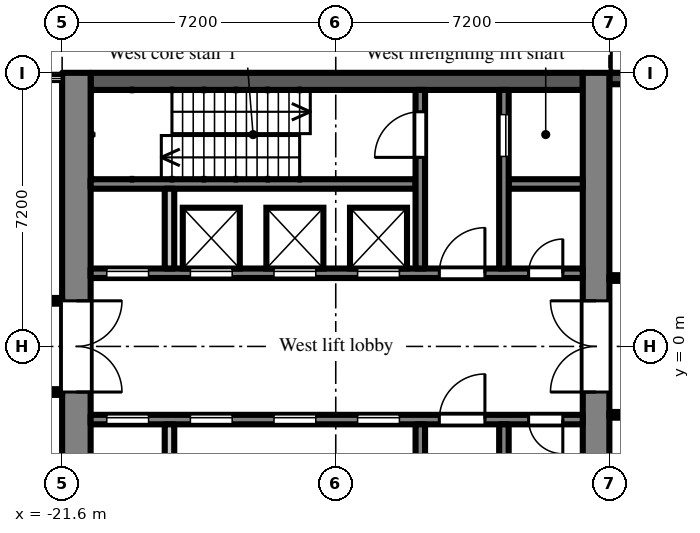
"""IFC4 building model, lengths in metres.
Left out: names, types, materials, properties, quantities, classifications, styles, units other than length and angle.
Written with IfcOpenShell. Run it as: python <this file> out.ifc"""

import sys

from ifc_helpers import new_model, si_unit, direction, frame, frame_2d, origin, place, context, subcontext, project, spatial, rectangle, extrude, element, fill, save


model = new_model("IFC4")
c1 = context("Model", 3, precision=1e-05, world=origin(), true_north=direction((0.0, 1.0)))
c2 = subcontext(c1, "Body", "Model", "MODEL_VIEW")
j1 = project(units=[si_unit("LENGTHUNIT", "METRE"), si_unit("PLANEANGLEUNIT", "RADIAN")], contexts=[c1])
p1 = place(None, origin())
s1 = spatial("IfcSite", under=j1, at=p1, CompositionType="ELEMENT")
p2 = place(p1, origin())
s2 = spatial("IfcBuilding", under=s1, at=p2, CompositionType="ELEMENT")
p3 = place(p2, frame((0.0, 0.0, 116.1)))
s3 = spatial("IfcBuildingStorey", under=s2, at=p3, CompositionType="ELEMENT", Elevation=116.1)
p4 = place(p3, frame((-4.2, 7.05, 0.0), z_axis=(0.0, 0.0, 1.0), x_axis=(-1.0, 0.0, 0.0)))
e1 = element("IfcWall", 1, at=p4, inside=s3, PredefinedType="SOLIDWALL", context=c2, shape_type="SweptSolid", body=[
    extrude(rectangle(XDim=3.0, YDim=0.3, at=frame_2d((1.5, 0.0))), origin(), (0.0, 0.0, 1.0), 3.4),
])
p5 = place(p3, frame((-7.55, -7.2, 0.0), z_axis=(0.0, 0.0, 1.0), x_axis=(0.0, 1.0, 0.0)))
e2 = element("IfcWall", 2, at=p5, inside=s3, PredefinedType="SHEAR", context=c2, shape_type="SweptSolid", body=[
    extrude(rectangle(XDim=14.4, YDim=0.7, at=frame_2d((7.2, 0.0))), origin(), (0.0, 0.0, 1.0), 3.8),
])
p6 = place(p5, frame((6.0, 0.0, 0.0)))
e3 = element("IfcOpeningElement", 3, at=p6, cuts=e2, PredefinedType="OPENING", context=c2, shape_type="SweptSolid", body=[
    extrude(rectangle(XDim=2.4, YDim=2.2, at=frame_2d((1.2, 1.1))), frame((0.0, 0.36, 0.0), z_axis=(0.0, -1.0, 0.0), x_axis=(1.0, 0.0, 0.0)), (0.0, 0.0, 1.0), 0.72),
])
p7 = place(p3, frame((-21.225, -7.2, 0.0), z_axis=(0.0, 0.0, 1.0), x_axis=(0.0, 1.0, 0.0)))
e4 = element("IfcWall", 4, at=p7, inside=s3, PredefinedType="SHEAR", context=c2, shape_type="SweptSolid", body=[
    extrude(rectangle(XDim=14.4, YDim=0.75, at=frame_2d((7.2, 0.0))), origin(), (0.0, 0.0, 1.0), 3.8),
])
p8 = place(p7, frame((6.0, 0.0, 0.0)))
e5 = element("IfcOpeningElement", 5, at=p8, cuts=e4, PredefinedType="OPENING", context=c2, shape_type="SweptSolid", body=[
    extrude(rectangle(XDim=2.4, YDim=2.2, at=frame_2d((1.2, 1.1))), frame((0.0, 0.385, 0.0), z_axis=(0.0, -1.0, 0.0), x_axis=(1.0, 0.0, 0.0)), (0.0, 0.0, 1.0), 0.77),
])
p9 = place(p3, frame((-7.9, 6.975, 0.0), z_axis=(0.0, 0.0, 1.0), x_axis=(-1.0, 0.0, 0.0)))
e6 = element("IfcWall", 6, at=p9, inside=s3, PredefinedType="SHEAR", context=c2, shape_type="SweptSolid", body=[
    extrude(rectangle(XDim=12.95, YDim=0.45, at=frame_2d((6.475, 0.0))), origin(), (0.0, 0.0, 1.0), 3.8),
])
p10 = place(p3, frame((-7.9, 1.925, 0.0), z_axis=(0.0, 0.0, 1.0), x_axis=(-1.0, 0.0, 0.0)))
e7 = element("IfcWall", 7, at=p10, inside=s3, PredefinedType="SHEAR", context=c2, shape_type="SweptSolid", body=[
    extrude(rectangle(XDim=12.95, YDim=0.25, at=frame_2d((6.475, 0.0))), origin(), (0.0, 0.0, 1.0), 3.8),
])
p11 = place(p10, frame((4.825, 0.0, 0.0)))
e8 = element("IfcOpeningElement", 8, at=p11, cuts=e7, PredefinedType="OPENING", context=c2, shape_type="SweptSolid", body=[
    extrude(rectangle(XDim=1.1, YDim=2.1, at=frame_2d((0.55, 1.05))), frame((0.0, 0.135, 0.0), z_axis=(0.0, -1.0, 0.0), x_axis=(1.0, 0.0, 0.0)), (0.0, 0.0, 1.0), 0.27),
])
p12 = place(p10, frame((7.025, 0.0, 0.0)))
e9 = element("IfcOpeningElement", 9, at=p12, cuts=e7, PredefinedType="OPENING", context=c2, shape_type="SweptSolid", body=[
    extrude(rectangle(XDim=1.1, YDim=2.1, at=frame_2d((0.55, 1.05))), frame((0.0, 0.135, 0.0), z_axis=(0.0, -1.0, 0.0), x_axis=(1.0, 0.0, 0.0)), (0.0, 0.0, 1.0), 0.27),
])
p13 = place(p10, frame((9.225, 0.0, 0.0)))
e10 = element("IfcOpeningElement", 10, at=p13, cuts=e7, PredefinedType="OPENING", context=c2, shape_type="SweptSolid", body=[
    extrude(rectangle(XDim=1.1, YDim=2.1, at=frame_2d((0.55, 1.05))), frame((0.0, 0.135, 0.0), z_axis=(0.0, -1.0, 0.0), x_axis=(1.0, 0.0, 0.0)), (0.0, 0.0, 1.0), 0.27),
])
p14 = place(p10, frame((11.425, 0.0, 0.0)))
e11 = element("IfcOpeningElement", 11, at=p14, cuts=e7, PredefinedType="OPENING", context=c2, shape_type="SweptSolid", body=[
    extrude(rectangle(XDim=1.1, YDim=2.1, at=frame_2d((0.55, 1.05))), frame((0.0, 0.135, 0.0), z_axis=(0.0, -1.0, 0.0), x_axis=(1.0, 0.0, 0.0)), (0.0, 0.0, 1.0), 0.27),
])
p15 = place(p10, frame((0.525, 0.0, 0.0)))
e12 = element("IfcOpeningElement", 12, at=p15, cuts=e7, PredefinedType="OPENING", context=c2, shape_type="SweptSolid", body=[
    extrude(rectangle(XDim=0.9, YDim=2.1, at=frame_2d((0.45, 1.05))), frame((0.0, 0.135, 0.0), z_axis=(0.0, -1.0, 0.0), x_axis=(1.0, 0.0, 0.0)), (0.0, 0.0, 1.0), 0.27),
])
p16 = place(p10, frame((2.575, 0.0, 0.0)))
e13 = element("IfcOpeningElement", 13, at=p16, cuts=e7, PredefinedType="OPENING", context=c2, shape_type="SweptSolid", body=[
    extrude(rectangle(XDim=1.2, YDim=2.1, at=frame_2d((0.6, 1.05))), frame((0.0, 0.135, 0.0), z_axis=(0.0, -1.0, 0.0), x_axis=(1.0, 0.0, 0.0)), (0.0, 0.0, 1.0), 0.27),
])
p17 = place(p3, frame((-7.9, 4.275, 0.0), z_axis=(0.0, 0.0, 1.0), x_axis=(-1.0, 0.0, 0.0)))
e14 = element("IfcWall", 14, at=p17, inside=s3, PredefinedType="SHEAR", context=c2, shape_type="SweptSolid", body=[
    extrude(rectangle(XDim=1.95, YDim=0.25, at=frame_2d((0.975, 0.0))), origin(), (0.0, 0.0, 1.0), 3.8),
])
p18 = place(p3, frame((-12.3, 4.275, 0.0), z_axis=(0.0, 0.0, 1.0), x_axis=(-1.0, 0.0, 0.0)))
e15 = element("IfcWall", 15, at=p18, inside=s3, PredefinedType="SHEAR", context=c2, shape_type="SweptSolid", body=[
    extrude(rectangle(XDim=8.55, YDim=0.25, at=frame_2d((4.275, 0.0))), origin(), (0.0, 0.0, 1.0), 3.8),
])
p19 = place(p3, frame((-9.975, 2.05, 0.0), z_axis=(0.0, 0.0, 1.0), x_axis=(0.0, 1.0, 0.0)))
e16 = element("IfcWall", 16, at=p19, inside=s3, PredefinedType="SHEAR", context=c2, shape_type="SweptSolid", body=[
    extrude(rectangle(XDim=4.7, YDim=0.25, at=frame_2d((2.35, 0.0))), origin(), (0.0, 0.0, 1.0), 3.8),
])
p20 = place(p19, frame((2.95, 0.0, 0.0)))
e17 = element("IfcOpeningElement", 17, at=p20, cuts=e16, PredefinedType="OPENING", context=c2, shape_type="SweptSolid", body=[
    extrude(rectangle(XDim=1.1, YDim=2.1, at=frame_2d((0.55, 1.05))), frame((0.0, 0.135, 0.0), z_axis=(0.0, -1.0, 0.0), x_axis=(1.0, 0.0, 0.0)), (0.0, 0.0, 1.0), 0.27),
])
p21 = place(p3, frame((-12.175, 2.05, 0.0), z_axis=(0.0, 0.0, 1.0), x_axis=(0.0, 1.0, 0.0)))
e18 = element("IfcWall", 18, at=p21, inside=s3, PredefinedType="SHEAR", context=c2, shape_type="SweptSolid", body=[
    extrude(rectangle(XDim=4.7, YDim=0.25, at=frame_2d((2.35, 0.0))), origin(), (0.0, 0.0, 1.0), 3.8),
])
p22 = place(p21, frame((2.925, 0.0, 0.0)))
e19 = element("IfcOpeningElement", 19, at=p22, cuts=e18, PredefinedType="OPENING", context=c2, shape_type="SweptSolid", body=[
    extrude(rectangle(XDim=1.2, YDim=2.1, at=frame_2d((0.6, 1.05))), frame((0.0, 0.135, 0.0), z_axis=(0.0, -1.0, 0.0), x_axis=(1.0, 0.0, 0.0)), (0.0, 0.0, 1.0), 0.27),
])
p23 = place(p3, frame((-18.775, 2.05, 0.0), z_axis=(0.0, 0.0, 1.0), x_axis=(0.0, 1.0, 0.0)))
e20 = element("IfcWall", 20, at=p23, inside=s3, PredefinedType="PARTITIONING", context=c2, shape_type="SweptSolid", body=[
    extrude(rectangle(XDim=2.1, YDim=0.25, at=frame_2d((1.05, 0.0))), origin(), (0.0, 0.0, 1.0), 3.8),
])
p24 = place(p3, frame((-7.9, -1.925, 0.0), z_axis=(0.0, 0.0, 1.0), x_axis=(-1.0, 0.0, 0.0)))
e21 = element("IfcWall", 21, at=p24, inside=s3, PredefinedType="SHEAR", context=c2, shape_type="SweptSolid", body=[
    extrude(rectangle(XDim=12.95, YDim=0.25, at=frame_2d((6.475, 0.0))), origin(), (0.0, 0.0, 1.0), 3.8),
])
p25 = place(p24, frame((4.825, 0.0, 0.0)))
e22 = element("IfcOpeningElement", 22, at=p25, cuts=e21, PredefinedType="OPENING", context=c2, shape_type="SweptSolid", body=[
    extrude(rectangle(XDim=1.1, YDim=2.1, at=frame_2d((0.55, 1.05))), frame((0.0, 0.135, 0.0), z_axis=(0.0, -1.0, 0.0), x_axis=(1.0, 0.0, 0.0)), (0.0, 0.0, 1.0), 0.27),
])
p26 = place(p24, frame((7.025, 0.0, 0.0)))
e23 = element("IfcOpeningElement", 23, at=p26, cuts=e21, PredefinedType="OPENING", context=c2, shape_type="SweptSolid", body=[
    extrude(rectangle(XDim=1.1, YDim=2.1, at=frame_2d((0.55, 1.05))), frame((0.0, 0.135, 0.0), z_axis=(0.0, -1.0, 0.0), x_axis=(1.0, 0.0, 0.0)), (0.0, 0.0, 1.0), 0.27),
])
p27 = place(p24, frame((9.225, 0.0, 0.0)))
e24 = element("IfcOpeningElement", 24, at=p27, cuts=e21, PredefinedType="OPENING", context=c2, shape_type="SweptSolid", body=[
    extrude(rectangle(XDim=1.1, YDim=2.1, at=frame_2d((0.55, 1.05))), frame((0.0, 0.135, 0.0), z_axis=(0.0, -1.0, 0.0), x_axis=(1.0, 0.0, 0.0)), (0.0, 0.0, 1.0), 0.27),
])
p28 = place(p24, frame((11.425, 0.0, 0.0)))
e25 = element("IfcOpeningElement", 25, at=p28, cuts=e21, PredefinedType="OPENING", context=c2, shape_type="SweptSolid", body=[
    extrude(rectangle(XDim=1.1, YDim=2.1, at=frame_2d((0.55, 1.05))), frame((0.0, 0.135, 0.0), z_axis=(0.0, -1.0, 0.0), x_axis=(1.0, 0.0, 0.0)), (0.0, 0.0, 1.0), 0.27),
])
p29 = place(p24, frame((0.525, 0.0, 0.0)))
e26 = element("IfcOpeningElement", 26, at=p29, cuts=e21, PredefinedType="OPENING", context=c2, shape_type="SweptSolid", body=[
    extrude(rectangle(XDim=0.9, YDim=2.1, at=frame_2d((0.45, 1.05))), frame((0.0, 0.135, 0.0), z_axis=(0.0, -1.0, 0.0), x_axis=(1.0, 0.0, 0.0)), (0.0, 0.0, 1.0), 0.27),
])
p30 = place(p24, frame((2.575, 0.0, 0.0)))
e27 = element("IfcOpeningElement", 27, at=p30, cuts=e21, PredefinedType="OPENING", context=c2, shape_type="SweptSolid", body=[
    extrude(rectangle(XDim=1.2, YDim=2.1, at=frame_2d((0.6, 1.05))), frame((0.0, 0.135, 0.0), z_axis=(0.0, -1.0, 0.0), x_axis=(1.0, 0.0, 0.0)), (0.0, 0.0, 1.0), 0.27),
])
p31 = place(p3, frame((-9.975, -2.05, 0.0), z_axis=(0.0, 0.0, 1.0), x_axis=(0.0, -1.0, 0.0)))
e28 = element("IfcWall", 28, at=p31, inside=s3, PredefinedType="SHEAR", context=c2, shape_type="SweptSolid", body=[
    extrude(rectangle(XDim=4.7, YDim=0.25, at=frame_2d((2.35, 0.0))), origin(), (0.0, 0.0, 1.0), 3.8),
])
p32 = place(p31, frame((2.95, 0.0, 0.0)))
e29 = element("IfcOpeningElement", 29, at=p32, cuts=e28, PredefinedType="OPENING", context=c2, shape_type="SweptSolid", body=[
    extrude(rectangle(XDim=1.1, YDim=2.1, at=frame_2d((0.55, 1.05))), frame((0.0, 0.135, 0.0), z_axis=(0.0, -1.0, 0.0), x_axis=(1.0, 0.0, 0.0)), (0.0, 0.0, 1.0), 0.27),
])
p33 = place(p3, frame((-12.175, -2.05, 0.0), z_axis=(0.0, 0.0, 1.0), x_axis=(0.0, -1.0, 0.0)))
e30 = element("IfcWall", 30, at=p33, inside=s3, PredefinedType="SHEAR", context=c2, shape_type="SweptSolid", body=[
    extrude(rectangle(XDim=4.7, YDim=0.25, at=frame_2d((2.35, 0.0))), origin(), (0.0, 0.0, 1.0), 3.8),
])
p34 = place(p33, frame((2.925, 0.0, 0.0)))
e31 = element("IfcOpeningElement", 31, at=p34, cuts=e30, PredefinedType="OPENING", context=c2, shape_type="SweptSolid", body=[
    extrude(rectangle(XDim=1.2, YDim=2.1, at=frame_2d((0.6, 1.05))), frame((0.0, 0.135, 0.0), z_axis=(0.0, -1.0, 0.0), x_axis=(1.0, 0.0, 0.0)), (0.0, 0.0, 1.0), 0.27),
])
p35 = place(p3, frame((-18.775, -2.05, 0.0), z_axis=(0.0, 0.0, 1.0), x_axis=(0.0, -1.0, 0.0)))
e32 = element("IfcWall", 32, at=p35, inside=s3, PredefinedType="PARTITIONING", context=c2, shape_type="SweptSolid", body=[
    extrude(rectangle(XDim=2.1, YDim=0.25, at=frame_2d((1.05, 0.0))), origin(), (0.0, 0.0, 1.0), 3.8),
])
p36 = place(p3, frame((-36.5, -1.2, 0.0), z_axis=(0.0, 0.0, 1.0), x_axis=(1.0, 0.0, 0.0)))
e33 = element("IfcWall", 33, at=p36, inside=s3, PredefinedType="PARTITIONING", context=c2, shape_type="SweptSolid", body=[
    extrude(rectangle(XDim=14.9, YDim=0.15, at=frame_2d((7.45, 0.0))), origin(), (0.0, 0.0, 1.0), 3.8),
])
p37 = place(p36, frame((6.15, 0.0, 0.0)))
e34 = element("IfcOpeningElement", 34, at=p37, cuts=e33, PredefinedType="OPENING", context=c2, shape_type="SweptSolid", body=[
    extrude(rectangle(XDim=1.8, YDim=2.1, at=frame_2d((0.9, 1.05))), frame((0.0, 0.085, 0.0), z_axis=(0.0, -1.0, 0.0), x_axis=(1.0, 0.0, 0.0)), (0.0, 0.0, 1.0), 0.17),
])
p38 = place(p36, frame((9.6, 0.0, 0.0)))
e35 = element("IfcOpeningElement", 35, at=p38, cuts=e33, PredefinedType="OPENING", context=c2, shape_type="SweptSolid", body=[
    extrude(rectangle(XDim=1.0, YDim=2.1, at=frame_2d((0.5, 1.05))), frame((0.0, 0.085, 0.0), z_axis=(0.0, -1.0, 0.0), x_axis=(1.0, 0.0, 0.0)), (0.0, 0.0, 1.0), 0.17),
])
p39 = place(p36, frame((12.45, 0.0, 0.0)))
e36 = element("IfcOpeningElement", 36, at=p39, cuts=e33, PredefinedType="OPENING", context=c2, shape_type="SweptSolid", body=[
    extrude(rectangle(XDim=1.8, YDim=2.1, at=frame_2d((0.9, 1.05))), frame((0.0, 0.085, 0.0), z_axis=(0.0, -1.0, 0.0), x_axis=(1.0, 0.0, 0.0)), (0.0, 0.0, 1.0), 0.17),
])
p40 = place(p36, frame((2.15, 0.0, 0.0)))
e37 = element("IfcOpeningElement", 37, at=p40, cuts=e33, PredefinedType="OPENING", context=c2, shape_type="SweptSolid", body=[
    extrude(rectangle(XDim=1.0, YDim=2.1, at=frame_2d((0.5, 1.05))), frame((0.0, 0.085, 0.0), z_axis=(0.0, -1.0, 0.0), x_axis=(1.0, 0.0, 0.0)), (0.0, 0.0, 1.0), 0.17),
])
p41 = place(p3, frame((-36.5, 1.2, 0.0), z_axis=(0.0, 0.0, 1.0), x_axis=(1.0, 0.0, 0.0)))
e38 = element("IfcWall", 38, at=p41, inside=s3, PredefinedType="PARTITIONING", context=c2, shape_type="SweptSolid", body=[
    extrude(rectangle(XDim=14.9, YDim=0.15, at=frame_2d((7.45, 0.0))), origin(), (0.0, 0.0, 1.0), 3.8),
])
p42 = place(p41, frame((3.55, 0.0, 0.0)))
e39 = element("IfcOpeningElement", 39, at=p42, cuts=e38, PredefinedType="OPENING", context=c2, shape_type="SweptSolid", body=[
    extrude(rectangle(XDim=1.8, YDim=2.1, at=frame_2d((0.9, 1.05))), frame((0.0, 0.085, 0.0), z_axis=(0.0, -1.0, 0.0), x_axis=(1.0, 0.0, 0.0)), (0.0, 0.0, 1.0), 0.17),
])
p43 = place(p41, frame((8.4, 0.0, 0.0)))
e40 = element("IfcOpeningElement", 40, at=p43, cuts=e38, PredefinedType="OPENING", context=c2, shape_type="SweptSolid", body=[
    extrude(rectangle(XDim=1.0, YDim=2.1, at=frame_2d((0.5, 1.05))), frame((0.0, 0.085, 0.0), z_axis=(0.0, -1.0, 0.0), x_axis=(1.0, 0.0, 0.0)), (0.0, 0.0, 1.0), 0.17),
])
p44 = place(p41, frame((12.25, 0.0, 0.0)))
e41 = element("IfcOpeningElement", 41, at=p44, cuts=e38, PredefinedType="OPENING", context=c2, shape_type="SweptSolid", body=[
    extrude(rectangle(XDim=1.8, YDim=2.1, at=frame_2d((0.9, 1.05))), frame((0.0, 0.085, 0.0), z_axis=(0.0, -1.0, 0.0), x_axis=(1.0, 0.0, 0.0)), (0.0, 0.0, 1.0), 0.17),
])
p45 = place(p41, frame((0.95, 0.0, 0.0)))
e42 = element("IfcOpeningElement", 42, at=p45, cuts=e38, PredefinedType="OPENING", context=c2, shape_type="SweptSolid", body=[
    extrude(rectangle(XDim=1.0, YDim=2.1, at=frame_2d((0.5, 1.05))), frame((0.0, 0.085, 0.0), z_axis=(0.0, -1.0, 0.0), x_axis=(1.0, 0.0, 0.0)), (0.0, 0.0, 1.0), 0.17),
])
p46 = place(p3, frame((-7.2, -1.8, 0.0), z_axis=(0.0, 0.0, 1.0), x_axis=(1.0, 0.0, 0.0)))
e43 = element("IfcWall", 43, at=p46, inside=s3, PredefinedType="PARTITIONING", context=c2, shape_type="SweptSolid", body=[
    extrude(rectangle(XDim=5.325, YDim=0.15, at=frame_2d((2.663, 0.0))), origin(), (0.0, 0.0, 1.0), 3.8),
])
p47 = place(p46, frame((1.17, 0.0, 0.0)))
e44 = element("IfcOpeningElement", 44, at=p47, cuts=e43, PredefinedType="OPENING", context=c2, shape_type="SweptSolid", body=[
    extrude(rectangle(XDim=0.9, YDim=2.1, at=frame_2d((0.45, 1.05))), frame((0.0, 0.085, 0.0), z_axis=(0.0, -1.0, 0.0), x_axis=(1.0, 0.0, 0.0)), (0.0, 0.0, 1.0), 0.17),
])
p48 = place(p3, frame((-7.2, 1.8, 0.0), z_axis=(0.0, 0.0, 1.0), x_axis=(1.0, 0.0, 0.0)))
e45 = element("IfcWall", 45, at=p48, inside=s3, PredefinedType="PARTITIONING", context=c2, shape_type="SweptSolid", body=[
    extrude(rectangle(XDim=5.325, YDim=0.15, at=frame_2d((2.663, 0.0))), origin(), (0.0, 0.0, 1.0), 3.8),
])
p49 = place(p48, frame((1.035, 0.0, 0.0)))
e46 = element("IfcOpeningElement", 46, at=p49, cuts=e45, PredefinedType="OPENING", context=c2, shape_type="SweptSolid", body=[
    extrude(rectangle(XDim=0.9, YDim=2.1, at=frame_2d((0.45, 1.05))), frame((0.0, 0.085, 0.0), z_axis=(0.0, -1.0, 0.0), x_axis=(1.0, 0.0, 0.0)), (0.0, 0.0, 1.0), 0.17),
])
p50 = place(p25, origin())
e47 = element("IfcDoor", 47, at=p50, inside=s3, OperationType="SLIDING_TO_LEFT", PredefinedType="DOOR", context=c2, shape_type="SweptSolid", body=[
    extrude(rectangle(XDim=1.1, YDim=2.1, at=frame_2d((0.55, 1.05))), frame((0.0, 0.025, 0.0), z_axis=(0.0, -1.0, 0.0), x_axis=(1.0, 0.0, 0.0)), (0.0, 0.0, 1.0), 0.05),
])
fill(e22, e47)
p51 = place(p26, origin())
e48 = element("IfcDoor", 48, at=p51, inside=s3, OperationType="SLIDING_TO_LEFT", PredefinedType="DOOR", context=c2, shape_type="SweptSolid", body=[
    extrude(rectangle(XDim=1.1, YDim=2.1, at=frame_2d((0.55, 1.05))), frame((0.0, 0.025, 0.0), z_axis=(0.0, -1.0, 0.0), x_axis=(1.0, 0.0, 0.0)), (0.0, 0.0, 1.0), 0.05),
])
fill(e23, e48)
p52 = place(p27, origin())
e49 = element("IfcDoor", 49, at=p52, inside=s3, OperationType="SLIDING_TO_LEFT", PredefinedType="DOOR", context=c2, shape_type="SweptSolid", body=[
    extrude(rectangle(XDim=1.1, YDim=2.1, at=frame_2d((0.55, 1.05))), frame((0.0, 0.025, 0.0), z_axis=(0.0, -1.0, 0.0), x_axis=(1.0, 0.0, 0.0)), (0.0, 0.0, 1.0), 0.05),
])
fill(e24, e49)
p53 = place(p28, origin())
e50 = element("IfcDoor", 50, at=p53, inside=s3, OperationType="SLIDING_TO_LEFT", PredefinedType="DOOR", context=c2, shape_type="SweptSolid", body=[
    extrude(rectangle(XDim=1.1, YDim=2.1, at=frame_2d((0.55, 1.05))), frame((0.0, 0.025, 0.0), z_axis=(0.0, -1.0, 0.0), x_axis=(1.0, 0.0, 0.0)), (0.0, 0.0, 1.0), 0.05),
])
fill(e25, e50)
p54 = place(p11, origin())
e51 = element("IfcDoor", 51, at=p54, inside=s3, OperationType="SLIDING_TO_LEFT", PredefinedType="DOOR", context=c2, shape_type="SweptSolid", body=[
    extrude(rectangle(XDim=1.1, YDim=2.1, at=frame_2d((0.55, 1.05))), frame((0.0, 0.025, 0.0), z_axis=(0.0, -1.0, 0.0), x_axis=(1.0, 0.0, 0.0)), (0.0, 0.0, 1.0), 0.05),
])
fill(e8, e51)
p55 = place(p12, origin())
e52 = element("IfcDoor", 52, at=p55, inside=s3, OperationType="SLIDING_TO_LEFT", PredefinedType="DOOR", context=c2, shape_type="SweptSolid", body=[
    extrude(rectangle(XDim=1.1, YDim=2.1, at=frame_2d((0.55, 1.05))), frame((0.0, 0.025, 0.0), z_axis=(0.0, -1.0, 0.0), x_axis=(1.0, 0.0, 0.0)), (0.0, 0.0, 1.0), 0.05),
])
fill(e9, e52)
p56 = place(p13, origin())
e53 = element("IfcDoor", 53, at=p56, inside=s3, OperationType="SLIDING_TO_LEFT", PredefinedType="DOOR", context=c2, shape_type="SweptSolid", body=[
    extrude(rectangle(XDim=1.1, YDim=2.1, at=frame_2d((0.55, 1.05))), frame((0.0, 0.025, 0.0), z_axis=(0.0, -1.0, 0.0), x_axis=(1.0, 0.0, 0.0)), (0.0, 0.0, 1.0), 0.05),
])
fill(e10, e53)
p57 = place(p14, origin())
e54 = element("IfcDoor", 54, at=p57, inside=s3, OperationType="SLIDING_TO_LEFT", PredefinedType="DOOR", context=c2, shape_type="SweptSolid", body=[
    extrude(rectangle(XDim=1.1, YDim=2.1, at=frame_2d((0.55, 1.05))), frame((0.0, 0.025, 0.0), z_axis=(0.0, -1.0, 0.0), x_axis=(1.0, 0.0, 0.0)), (0.0, 0.0, 1.0), 0.05),
])
fill(e11, e54)
p58 = place(p20, origin())
e55 = element("IfcDoor", 55, at=p58, inside=s3, OperationType="SLIDING_TO_LEFT", PredefinedType="DOOR", context=c2, shape_type="SweptSolid", body=[
    extrude(rectangle(XDim=1.1, YDim=2.1, at=frame_2d((0.55, 1.05))), frame((0.0, 0.025, 0.0), z_axis=(0.0, -1.0, 0.0), x_axis=(1.0, 0.0, 0.0)), (0.0, 0.0, 1.0), 0.05),
])
fill(e17, e55)
p59 = place(p22, origin())
e56 = element("IfcDoor", 56, at=p59, inside=s3, OperationType="SINGLE_SWING_LEFT", PredefinedType="DOOR", context=c2, shape_type="SweptSolid", body=[
    extrude(rectangle(XDim=1.2, YDim=2.1, at=frame_2d((0.6, 1.05))), frame((0.0, 0.025, 0.0), z_axis=(0.0, -1.0, 0.0), x_axis=(1.0, 0.0, 0.0)), (0.0, 0.0, 1.0), 0.05),
])
fill(e19, e56)
p60 = place(p15, frame((0.9, 0.0, 0.0), z_axis=(0.0, 0.0, 1.0), x_axis=(-1.0, 0.0, 0.0)))
e57 = element("IfcDoor", 57, at=p60, inside=s3, OperationType="SINGLE_SWING_RIGHT", PredefinedType="DOOR", context=c2, shape_type="SweptSolid", body=[
    extrude(rectangle(XDim=0.9, YDim=2.1, at=frame_2d((0.45, 1.05))), frame((0.0, 0.025, 0.0), z_axis=(0.0, -1.0, 0.0), x_axis=(1.0, 0.0, 0.0)), (0.0, 0.0, 1.0), 0.05),
])
fill(e12, e57)
p61 = place(p29, origin())
e58 = element("IfcDoor", 58, at=p61, inside=s3, OperationType="SINGLE_SWING_LEFT", PredefinedType="DOOR", context=c2, shape_type="SweptSolid", body=[
    extrude(rectangle(XDim=0.9, YDim=2.1, at=frame_2d((0.45, 1.05))), frame((0.0, 0.025, 0.0), z_axis=(0.0, -1.0, 0.0), x_axis=(1.0, 0.0, 0.0)), (0.0, 0.0, 1.0), 0.05),
])
fill(e26, e58)
p62 = place(p16, frame((1.2, 0.0, 0.0), z_axis=(0.0, 0.0, 1.0), x_axis=(-1.0, 0.0, 0.0)))
e59 = element("IfcDoor", 59, at=p62, inside=s3, OperationType="SINGLE_SWING_RIGHT", PredefinedType="DOOR", context=c2, shape_type="SweptSolid", body=[
    extrude(rectangle(XDim=1.2, YDim=2.1, at=frame_2d((0.6, 1.05))), frame((0.0, 0.025, 0.0), z_axis=(0.0, -1.0, 0.0), x_axis=(1.0, 0.0, 0.0)), (0.0, 0.0, 1.0), 0.05),
])
fill(e13, e59)
p63 = place(p30, frame((1.2, 0.0, 0.0), z_axis=(0.0, 0.0, 1.0), x_axis=(-1.0, 0.0, 0.0)))
e60 = element("IfcDoor", 60, at=p63, inside=s3, OperationType="SINGLE_SWING_RIGHT", PredefinedType="DOOR", context=c2, shape_type="SweptSolid", body=[
    extrude(rectangle(XDim=1.2, YDim=2.1, at=frame_2d((0.6, 1.05))), frame((0.0, 0.025, 0.0), z_axis=(0.0, -1.0, 0.0), x_axis=(1.0, 0.0, 0.0)), (0.0, 0.0, 1.0), 0.05),
])
fill(e27, e60)
p64 = place(p6, origin())
e61 = element("IfcDoor", 61, at=p64, inside=s3, OperationType="DOUBLE_DOOR_DOUBLE_SWING", PredefinedType="DOOR", context=c2, shape_type="SweptSolid", body=[
    extrude(rectangle(XDim=2.4, YDim=2.2, at=frame_2d((1.2, 1.1))), frame((0.0, 0.025, 0.0), z_axis=(0.0, -1.0, 0.0), x_axis=(1.0, 0.0, 0.0)), (0.0, 0.0, 1.0), 0.05),
])
fill(e3, e61)
p65 = place(p8, frame((2.4, 0.0, 0.0), z_axis=(0.0, 0.0, 1.0), x_axis=(-1.0, 0.0, 0.0)))
e62 = element("IfcDoor", 62, at=p65, inside=s3, OperationType="DOUBLE_DOOR_DOUBLE_SWING", PredefinedType="DOOR", context=c2, shape_type="SweptSolid", body=[
    extrude(rectangle(XDim=2.4, YDim=2.2, at=frame_2d((1.2, 1.1))), frame((0.0, 0.025, 0.0), z_axis=(0.0, -1.0, 0.0), x_axis=(1.0, 0.0, 0.0)), (0.0, 0.0, 1.0), 0.05),
])
fill(e5, e62)
save(model, sys.argv[1])
